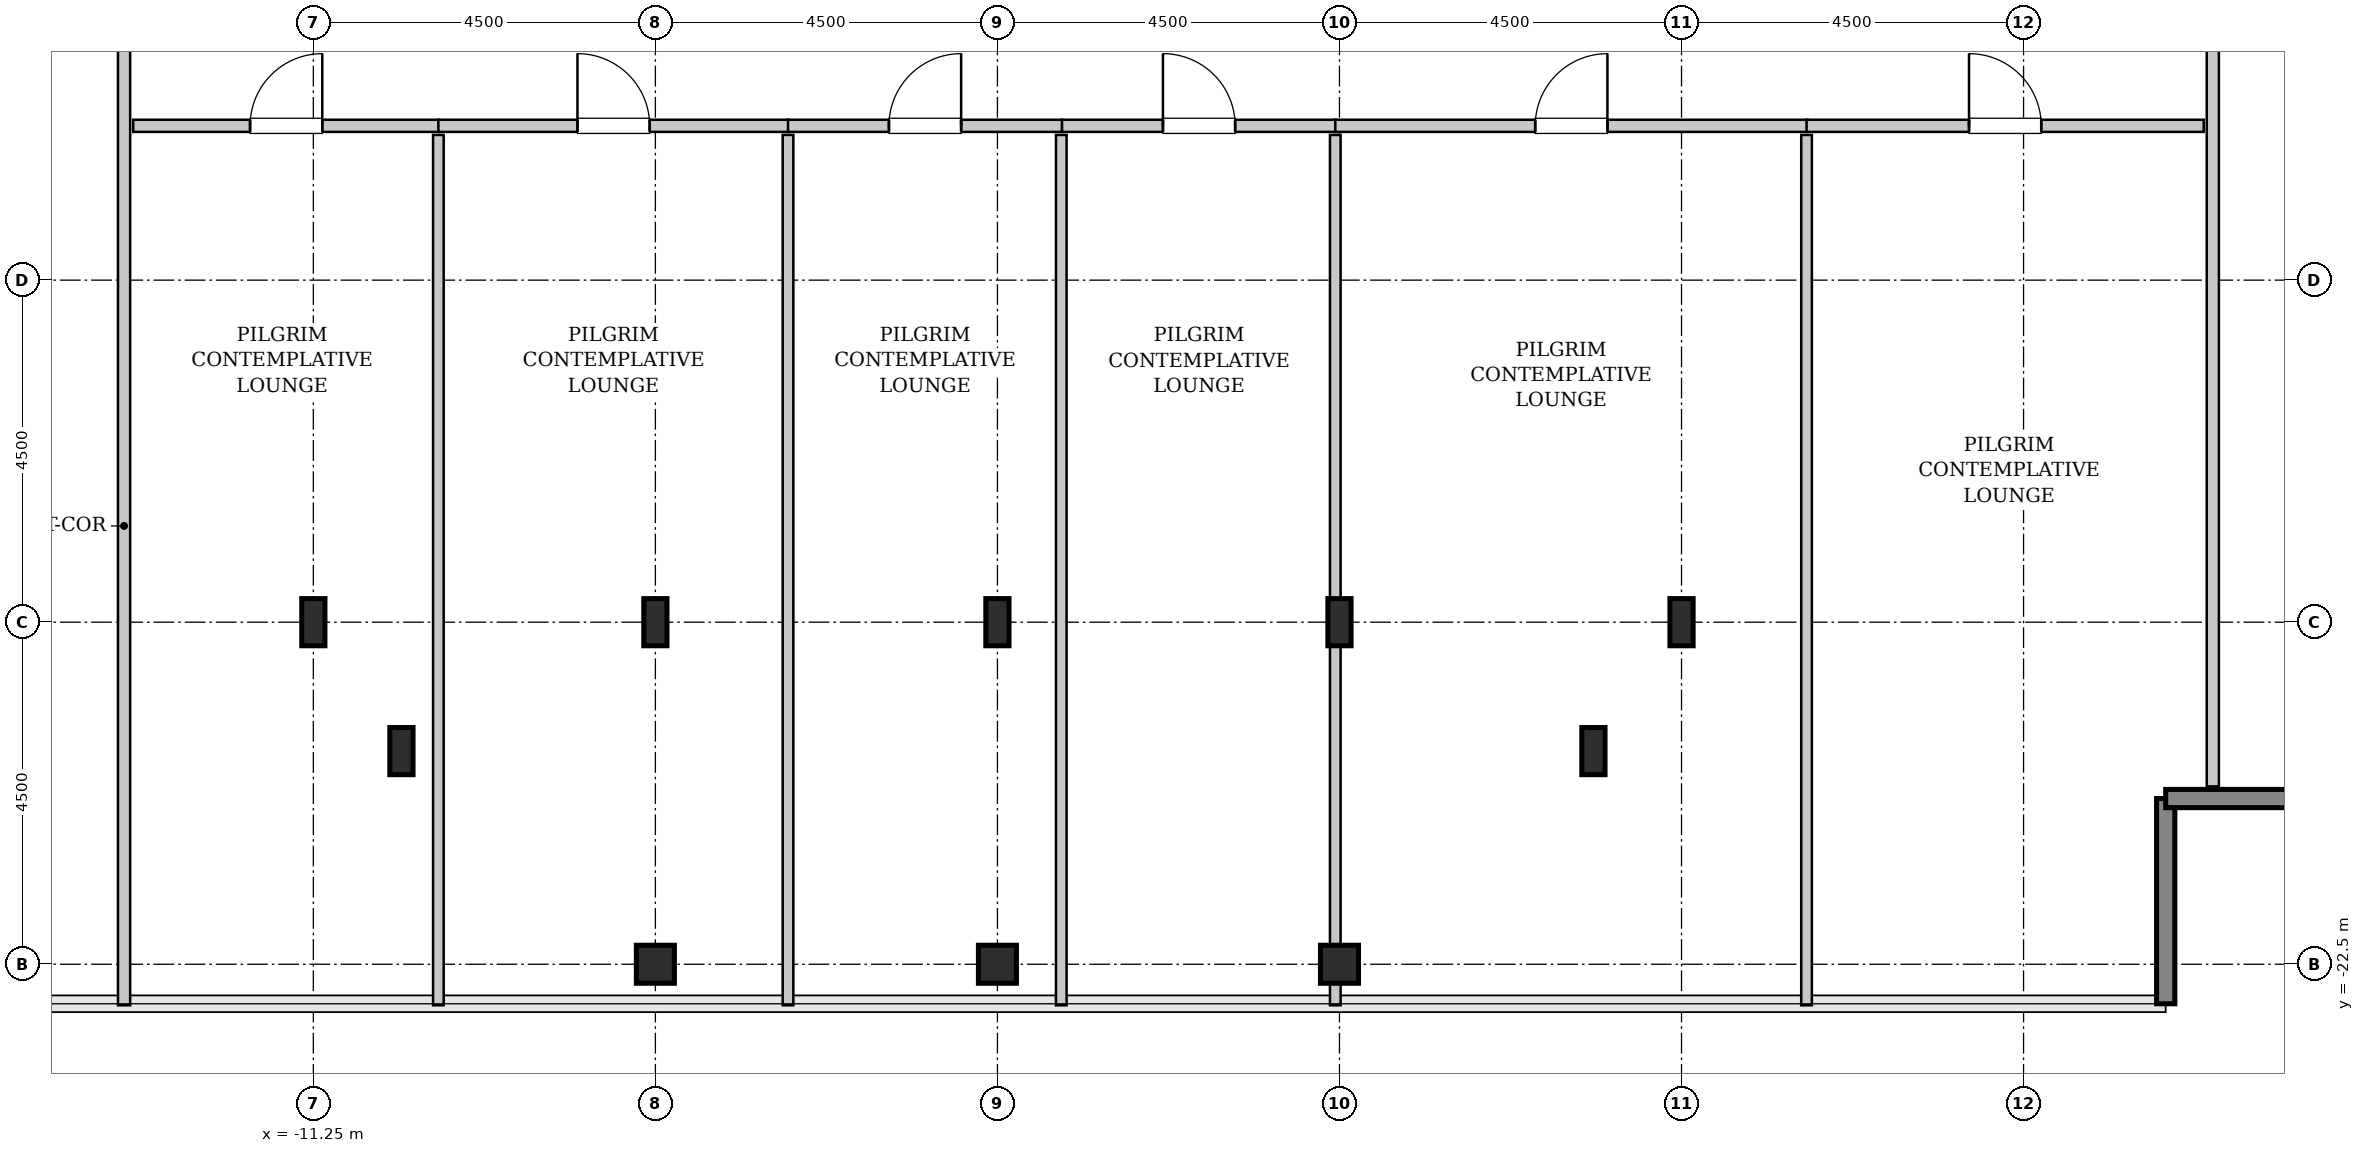
"""IFC4 building model, lengths in metres.
Left out: names, types, materials, properties, quantities, classifications, styles, units other than length and angle.
Written with IfcOpenShell. Run it as: python <this file> out.ifc"""

import sys

from ifc_helpers import new_model, si_unit, direction, frame, frame_2d, origin, origin_2d, place, context, subcontext, project, spatial, rectangle, hollow_rectangle, i_section, extrude, source, transform, mapped, element, fill, save


model = new_model("IFC4")
c1 = context("Model", 3, precision=1e-05, world=origin(), true_north=direction((0.0, 1.0)))
c2 = subcontext(c1, "Body", "Model", "MODEL_VIEW")
j1 = project(units=[si_unit("LENGTHUNIT", "METRE"), si_unit("PLANEANGLEUNIT", "RADIAN")], contexts=[c1])
p1 = place(None, origin())
s1 = spatial("IfcSite", under=j1, at=p1, CompositionType="ELEMENT")
p2 = place(p1, origin())
s2 = spatial("IfcBuilding", under=s1, at=p2, CompositionType="ELEMENT")
p3 = place(p2, frame((0.0, 0.0, 341.4)))
s3 = spatial("IfcBuildingStorey", under=s2, at=p3, CompositionType="ELEMENT", Elevation=341.4)
m1 = source(origin(), c2, "Body", "SweptSolid", [
    extrude(i_section(OverallWidth=0.305, OverallDepth=0.62, WebThickness=0.021, FlangeThickness=0.04, FilletRadius=0.027, at=origin_2d()), origin(), (0.0, 0.0, 1.0), 3.8),
])
for number, where, z_axis, x_axis in (
    (1, (-11.25, -18.0, 0.0), (0.0, 0.0, 1.0), (1.0, 0.0, 0.0)),
    (2, (-10.091, -19.696, 0.0), (0.0, 0.0, 1.0), (1.0, 0.0, 0.0)),
):
    element("IfcColumn", number, at=place(p3, frame(where, z_axis=z_axis, x_axis=x_axis)), inside=s3, PredefinedType="COLUMN", context=c2, shape_type="MappedRepresentation", body=[
        mapped(m1, transform((0.0, 0.0, 0.0), x_axis=(1.0, 0.0, 0.0), y_axis=(0.0, 1.0, 0.0), z_axis=(0.0, 0.0, 1.0), scale=1.0)),
    ])
m2 = source(origin(), c2, "Body", "SweptSolid", [
    extrude(hollow_rectangle(XDim=0.5, YDim=0.5, WallThickness=0.025, InnerFilletRadius=0.025, OuterFilletRadius=0.05, at=origin_2d()), origin(), (0.0, 0.0, 1.0), 3.8),
])
p4 = place(p3, frame((-6.75, -22.5, 0.0), z_axis=(0.0, 0.0, 1.0), x_axis=(1.0, 0.0, 0.0)))
e3 = element("IfcColumn", 3, at=p4, inside=s3, PredefinedType="COLUMN", context=c2, shape_type="MappedRepresentation", body=[
    mapped(m2, transform((0.0, 0.0, 0.0), x_axis=(1.0, 0.0, 0.0), y_axis=(0.0, 1.0, 0.0), z_axis=(0.0, 0.0, 1.0), scale=1.0)),
])
p5 = place(p3, frame((-6.75, -18.0, 0.0), z_axis=(0.0, 0.0, 1.0), x_axis=(1.0, 0.0, 0.0)))
e4 = element("IfcColumn", 4, at=p5, inside=s3, PredefinedType="COLUMN", context=c2, shape_type="MappedRepresentation", body=[
    mapped(m1, transform((0.0, 0.0, 0.0), x_axis=(1.0, 0.0, 0.0), y_axis=(0.0, 1.0, 0.0), z_axis=(0.0, 0.0, 1.0), scale=1.0)),
])
p6 = place(p3, frame((-2.25, -22.5, 0.0), z_axis=(0.0, 0.0, 1.0), x_axis=(1.0, 0.0, 0.0)))
e5 = element("IfcColumn", 5, at=p6, inside=s3, PredefinedType="COLUMN", context=c2, shape_type="MappedRepresentation", body=[
    mapped(m2, transform((0.0, 0.0, 0.0), x_axis=(1.0, 0.0, 0.0), y_axis=(0.0, 1.0, 0.0), z_axis=(0.0, 0.0, 1.0), scale=1.0)),
])
p7 = place(p3, frame((-2.25, -18.0, 0.0), z_axis=(0.0, 0.0, 1.0), x_axis=(1.0, 0.0, 0.0)))
e6 = element("IfcColumn", 6, at=p7, inside=s3, PredefinedType="COLUMN", context=c2, shape_type="MappedRepresentation", body=[
    mapped(m1, transform((0.0, 0.0, 0.0), x_axis=(1.0, 0.0, 0.0), y_axis=(0.0, 1.0, 0.0), z_axis=(0.0, 0.0, 1.0), scale=1.0)),
])
p8 = place(p3, frame((2.25, -22.5, 0.0), z_axis=(0.0, 0.0, 1.0), x_axis=(1.0, 0.0, 0.0)))
e7 = element("IfcColumn", 7, at=p8, inside=s3, PredefinedType="COLUMN", context=c2, shape_type="MappedRepresentation", body=[
    mapped(m2, transform((0.0, 0.0, 0.0), x_axis=(1.0, 0.0, 0.0), y_axis=(0.0, 1.0, 0.0), z_axis=(0.0, 0.0, 1.0), scale=1.0)),
])
for number, where, z_axis, x_axis in (
    (8, (2.25, -18.0, 0.0), (0.0, 0.0, 1.0), (1.0, 0.0, 0.0)),
    (9, (5.591, -19.696, 0.0), (0.0, 0.0, 1.0), (1.0, 0.0, 0.0)),
    (10, (6.75, -18.0, 0.0), (0.0, 0.0, 1.0), (1.0, 0.0, 0.0)),
):
    element("IfcColumn", number, at=place(p3, frame(where, z_axis=z_axis, x_axis=x_axis)), inside=s3, PredefinedType="COLUMN", context=c2, shape_type="MappedRepresentation", body=[
        mapped(m1, transform((0.0, 0.0, 0.0), x_axis=(1.0, 0.0, 0.0), y_axis=(0.0, 1.0, 0.0), z_axis=(0.0, 0.0, 1.0), scale=1.0)),
    ])
m3 = source(origin(), c2, "Body", "SweptSolid", [
    extrude(rectangle(XDim=2.7, YDim=0.24, at=frame_2d((1.35, 0.0))), origin(), (0.0, 0.0, 1.0), 3.55),
])
for number, where, z_axis, x_axis in (
    (11, (13.12, -23.02, 0.0), (0.0, 0.0, 1.0), (0.0, 1.0, 0.0)),
    (12, (13.12, -20.32, 0.0), (0.0, 0.0, 1.0), (1.0, 0.0, 0.0)),
):
    element("IfcWall", number, at=place(p3, frame(where, z_axis=z_axis, x_axis=x_axis)), inside=s3, PredefinedType="SHEAR", context=c2, shape_type="MappedRepresentation", body=[
        mapped(m3, transform((0.0, 0.0, 0.0), x_axis=(1.0, 0.0, 0.0), y_axis=(0.0, 1.0, 0.0), z_axis=(0.0, 0.0, 1.0), scale=1.0)),
    ])
m4 = source(origin(), c2, "Body", "SweptSolid", [
    extrude(rectangle(XDim=14.545, YDim=0.16, at=frame_2d((7.272, 0.0))), origin(), (0.0, 0.0, 1.0), 3.535),
])
p9 = place(p3, frame((-13.74, -23.04, 0.0), z_axis=(0.0, 0.0, 1.0), x_axis=(0.0, 1.0, 0.0)))
e13 = element("IfcWall", 13, at=p9, inside=s3, PredefinedType="PARTITIONING", context=c2, shape_type="MappedRepresentation", body=[
    mapped(m4, transform((0.0, 0.0, 0.0), x_axis=(1.0, 0.0, 0.0), y_axis=(0.0, 1.0, 0.0), z_axis=(0.0, 0.0, 1.0), scale=1.0)),
])
p10 = place(p9, frame((12.562, 0.0, 0.0)))
e14 = element("IfcOpeningElement", 14, at=p10, cuts=e13, PredefinedType="OPENING", context=c2, shape_type="SweptSolid", body=[
    extrude(rectangle(XDim=0.95, YDim=2.1, at=frame_2d((0.475, 1.05))), frame((0.0, 0.09, 0.0), z_axis=(0.0, -1.0, 0.0), x_axis=(1.0, 0.0, 0.0)), (0.0, 0.0, 1.0), 0.18),
])
m5 = source(origin(), c2, "Body", "SweptSolid", [
    extrude(rectangle(XDim=12.365, YDim=0.16, at=frame_2d((6.183, 0.0))), origin(), (0.0, 0.0, 1.0), 3.535),
])
p11 = place(p3, frame((13.74, -20.16, 0.0), z_axis=(0.0, 0.0, 1.0), x_axis=(0.0, 1.0, 0.0)))
e15 = element("IfcWall", 15, at=p11, inside=s3, PredefinedType="PARTITIONING", context=c2, shape_type="MappedRepresentation", body=[
    mapped(m5, transform((0.0, 0.0, 0.0), x_axis=(1.0, 0.0, 0.0), y_axis=(0.0, 1.0, 0.0), z_axis=(0.0, 0.0, 1.0), scale=1.0)),
])
p12 = place(p11, frame((10.032, 0.0, 0.0)))
e16 = element("IfcOpeningElement", 16, at=p12, cuts=e15, PredefinedType="OPENING", context=c2, shape_type="SweptSolid", body=[
    extrude(rectangle(XDim=0.95, YDim=2.1, at=frame_2d((0.475, 1.05))), frame((0.0, 0.09, 0.0), z_axis=(0.0, -1.0, 0.0), x_axis=(1.0, 0.0, 0.0)), (0.0, 0.0, 1.0), 0.18),
])
m6 = source(origin(), c2, "Body", "SweptSolid", [
    extrude(rectangle(XDim=4.025, YDim=0.16, at=frame_2d((2.013, 0.0))), origin(), (0.0, 0.0, 1.0), 3.535),
])
p13 = place(p3, frame((-13.62, -11.47, 0.0), z_axis=(0.0, 0.0, 1.0), x_axis=(1.0, 0.0, 0.0)))
e17 = element("IfcWall", 17, at=p13, inside=s3, PredefinedType="PARTITIONING", context=c2, shape_type="MappedRepresentation", body=[
    mapped(m6, transform((0.0, 0.0, 0.0), x_axis=(1.0, 0.0, 0.0), y_axis=(0.0, 1.0, 0.0), z_axis=(0.0, 0.0, 1.0), scale=1.0)),
])
p14 = place(p13, frame((1.538, 0.0, 0.0)))
e18 = element("IfcOpeningElement", 18, at=p14, cuts=e17, PredefinedType="OPENING", context=c2, shape_type="SweptSolid", body=[
    extrude(rectangle(XDim=0.95, YDim=2.1, at=frame_2d((0.475, 1.05))), frame((0.0, 0.09, 0.0), z_axis=(0.0, -1.0, 0.0), x_axis=(1.0, 0.0, 0.0)), (0.0, 0.0, 1.0), 0.18),
])
m7 = source(origin(), c2, "Body", "SweptSolid", [
    extrude(rectangle(XDim=11.45, YDim=0.14, at=frame_2d((5.725, 0.0))), origin(), (0.0, 0.0, 1.0), 3.535),
])
p15 = place(p3, frame((-9.605, -23.04, 0.0), z_axis=(0.0, 0.0, 1.0), x_axis=(0.0, 1.0, 0.0)))
e19 = element("IfcWall", 19, at=p15, inside=s3, PredefinedType="PARTITIONING", context=c2, shape_type="MappedRepresentation", body=[
    mapped(m7, transform((0.0, 0.0, 0.0), x_axis=(1.0, 0.0, 0.0), y_axis=(0.0, 1.0, 0.0), z_axis=(0.0, 0.0, 1.0), scale=1.0)),
])
m8 = source(origin(), c2, "Body", "SweptSolid", [
    extrude(rectangle(XDim=4.61, YDim=0.16, at=frame_2d((2.305, 0.0))), origin(), (0.0, 0.0, 1.0), 3.535),
])
p16 = place(p3, frame((-9.605, -11.47, 0.0), z_axis=(0.0, 0.0, 1.0), x_axis=(1.0, 0.0, 0.0)))
e20 = element("IfcWall", 20, at=p16, inside=s3, PredefinedType="PARTITIONING", context=c2, shape_type="MappedRepresentation", body=[
    mapped(m8, transform((0.0, 0.0, 0.0), x_axis=(1.0, 0.0, 0.0), y_axis=(0.0, 1.0, 0.0), z_axis=(0.0, 0.0, 1.0), scale=1.0)),
])
p17 = place(p16, frame((1.83, 0.0, 0.0)))
e21 = element("IfcOpeningElement", 21, at=p17, cuts=e20, PredefinedType="OPENING", context=c2, shape_type="SweptSolid", body=[
    extrude(rectangle(XDim=0.95, YDim=2.1, at=frame_2d((0.475, 1.05))), frame((0.0, 0.09, 0.0), z_axis=(0.0, -1.0, 0.0), x_axis=(1.0, 0.0, 0.0)), (0.0, 0.0, 1.0), 0.18),
])
p18 = place(p3, frame((-5.005, -23.04, 0.0), z_axis=(0.0, 0.0, 1.0), x_axis=(0.0, 1.0, 0.0)))
e22 = element("IfcWall", 22, at=p18, inside=s3, PredefinedType="PARTITIONING", context=c2, shape_type="MappedRepresentation", body=[
    mapped(m7, transform((0.0, 0.0, 0.0), x_axis=(1.0, 0.0, 0.0), y_axis=(0.0, 1.0, 0.0), z_axis=(0.0, 0.0, 1.0), scale=1.0)),
])
m9 = source(origin(), c2, "Body", "SweptSolid", [
    extrude(rectangle(XDim=3.605, YDim=0.16, at=frame_2d((1.802, 0.0))), origin(), (0.0, 0.0, 1.0), 3.535),
])
p19 = place(p3, frame((-5.005, -11.47, 0.0), z_axis=(0.0, 0.0, 1.0), x_axis=(1.0, 0.0, 0.0)))
e23 = element("IfcWall", 23, at=p19, inside=s3, PredefinedType="PARTITIONING", context=c2, shape_type="MappedRepresentation", body=[
    mapped(m9, transform((0.0, 0.0, 0.0), x_axis=(1.0, 0.0, 0.0), y_axis=(0.0, 1.0, 0.0), z_axis=(0.0, 0.0, 1.0), scale=1.0)),
])
p20 = place(p19, frame((1.327, 0.0, 0.0)))
e24 = element("IfcOpeningElement", 24, at=p20, cuts=e23, PredefinedType="OPENING", context=c2, shape_type="SweptSolid", body=[
    extrude(rectangle(XDim=0.95, YDim=2.1, at=frame_2d((0.475, 1.05))), frame((0.0, 0.09, 0.0), z_axis=(0.0, -1.0, 0.0), x_axis=(1.0, 0.0, 0.0)), (0.0, 0.0, 1.0), 0.18),
])
p21 = place(p3, frame((-1.41, -23.04, 0.0), z_axis=(0.0, 0.0, 1.0), x_axis=(0.0, 1.0, 0.0)))
e25 = element("IfcWall", 25, at=p21, inside=s3, PredefinedType="PARTITIONING", context=c2, shape_type="MappedRepresentation", body=[
    mapped(m7, transform((0.0, 0.0, 0.0), x_axis=(1.0, 0.0, 0.0), y_axis=(0.0, 1.0, 0.0), z_axis=(0.0, 0.0, 1.0), scale=1.0)),
])
p22 = place(p3, frame((-1.4, -11.47, 0.0), z_axis=(0.0, 0.0, 1.0), x_axis=(1.0, 0.0, 0.0)))
e26 = element("IfcWall", 26, at=p22, inside=s3, PredefinedType="PARTITIONING", context=c2, shape_type="MappedRepresentation", body=[
    mapped(m9, transform((0.0, 0.0, 0.0), x_axis=(1.0, 0.0, 0.0), y_axis=(0.0, 1.0, 0.0), z_axis=(0.0, 0.0, 1.0), scale=1.0)),
])
p23 = place(p22, frame((1.327, 0.0, 0.0)))
e27 = element("IfcOpeningElement", 27, at=p23, cuts=e26, PredefinedType="OPENING", context=c2, shape_type="SweptSolid", body=[
    extrude(rectangle(XDim=0.95, YDim=2.1, at=frame_2d((0.475, 1.05))), frame((0.0, 0.09, 0.0), z_axis=(0.0, -1.0, 0.0), x_axis=(1.0, 0.0, 0.0)), (0.0, 0.0, 1.0), 0.18),
])
m10 = source(origin(), c2, "Body", "SweptSolid", [
    extrude(rectangle(XDim=11.45, YDim=0.14, at=frame_2d((5.725, 0.0))), origin(), (0.0, 0.0, 1.0), 2.975),
])
p24 = place(p3, frame((2.195, -23.04, 0.0), z_axis=(0.0, 0.0, 1.0), x_axis=(0.0, 1.0, 0.0)))
e28 = element("IfcWall", 28, at=p24, inside=s3, PredefinedType="PARTITIONING", context=c2, shape_type="MappedRepresentation", body=[
    mapped(m10, transform((0.0, 0.0, 0.0), x_axis=(1.0, 0.0, 0.0), y_axis=(0.0, 1.0, 0.0), z_axis=(0.0, 0.0, 1.0), scale=1.0)),
])
m11 = source(origin(), c2, "Body", "SweptSolid", [
    extrude(rectangle(XDim=6.21, YDim=0.16, at=frame_2d((3.105, 0.0))), origin(), (0.0, 0.0, 1.0), 3.535),
])
p25 = place(p3, frame((2.195, -11.47, 0.0), z_axis=(0.0, 0.0, 1.0), x_axis=(1.0, 0.0, 0.0)))
e29 = element("IfcWall", 29, at=p25, inside=s3, PredefinedType="PARTITIONING", context=c2, shape_type="MappedRepresentation", body=[
    mapped(m11, transform((0.0, 0.0, 0.0), x_axis=(1.0, 0.0, 0.0), y_axis=(0.0, 1.0, 0.0), z_axis=(0.0, 0.0, 1.0), scale=1.0)),
])
p26 = place(p25, frame((2.63, 0.0, 0.0)))
e30 = element("IfcOpeningElement", 30, at=p26, cuts=e29, PredefinedType="OPENING", context=c2, shape_type="SweptSolid", body=[
    extrude(rectangle(XDim=0.95, YDim=2.1, at=frame_2d((0.475, 1.05))), frame((0.0, 0.09, 0.0), z_axis=(0.0, -1.0, 0.0), x_axis=(1.0, 0.0, 0.0)), (0.0, 0.0, 1.0), 0.18),
])
p27 = place(p3, frame((8.395, -23.04, 0.0), z_axis=(0.0, 0.0, 1.0), x_axis=(0.0, 1.0, 0.0)))
e31 = element("IfcWall", 31, at=p27, inside=s3, PredefinedType="PARTITIONING", context=c2, shape_type="MappedRepresentation", body=[
    mapped(m7, transform((0.0, 0.0, 0.0), x_axis=(1.0, 0.0, 0.0), y_axis=(0.0, 1.0, 0.0), z_axis=(0.0, 0.0, 1.0), scale=1.0)),
])
m12 = source(origin(), c2, "Body", "SweptSolid", [
    extrude(rectangle(XDim=5.225, YDim=0.16, at=frame_2d((2.613, 0.0))), origin(), (0.0, 0.0, 1.0), 3.535),
])
p28 = place(p3, frame((8.395, -11.47, 0.0), z_axis=(0.0, 0.0, 1.0), x_axis=(1.0, 0.0, 0.0)))
e32 = element("IfcWall", 32, at=p28, inside=s3, PredefinedType="PARTITIONING", context=c2, shape_type="MappedRepresentation", body=[
    mapped(m12, transform((0.0, 0.0, 0.0), x_axis=(1.0, 0.0, 0.0), y_axis=(0.0, 1.0, 0.0), z_axis=(0.0, 0.0, 1.0), scale=1.0)),
])
p29 = place(p28, frame((2.137, 0.0, 0.0)))
e33 = element("IfcOpeningElement", 33, at=p29, cuts=e32, PredefinedType="OPENING", context=c2, shape_type="SweptSolid", body=[
    extrude(rectangle(XDim=0.95, YDim=2.1, at=frame_2d((0.475, 1.05))), frame((0.0, 0.09, 0.0), z_axis=(0.0, -1.0, 0.0), x_axis=(1.0, 0.0, 0.0)), (0.0, 0.0, 1.0), 0.18),
])
m13 = source(origin(), c2, "Body", "SweptSolid", [
    extrude(rectangle(XDim=0.95, YDim=2.1, at=frame_2d((0.475, 1.05))), frame((0.0, 0.025, 0.0), z_axis=(0.0, -1.0, 0.0), x_axis=(1.0, 0.0, 0.0)), (0.0, 0.0, 1.0), 0.05),
])
p30 = place(p14, origin())
e34 = element("IfcDoor", 34, at=p30, inside=s3, OperationType="SINGLE_SWING_RIGHT", PredefinedType="DOOR", context=c2, shape_type="MappedRepresentation", body=[
    mapped(m13, transform((0.0, 0.0, 0.0), x_axis=(1.0, 0.0, 0.0), y_axis=(0.0, 1.0, 0.0), z_axis=(0.0, 0.0, 1.0), scale=1.0)),
])
fill(e18, e34)
p31 = place(p17, origin())
e35 = element("IfcDoor", 35, at=p31, inside=s3, OperationType="SINGLE_SWING_LEFT", PredefinedType="DOOR", context=c2, shape_type="MappedRepresentation", body=[
    mapped(m13, transform((0.0, 0.0, 0.0), x_axis=(1.0, 0.0, 0.0), y_axis=(0.0, 1.0, 0.0), z_axis=(0.0, 0.0, 1.0), scale=1.0)),
])
fill(e21, e35)
p32 = place(p20, origin())
e36 = element("IfcDoor", 36, at=p32, inside=s3, OperationType="SINGLE_SWING_RIGHT", PredefinedType="DOOR", context=c2, shape_type="MappedRepresentation", body=[
    mapped(m13, transform((0.0, 0.0, 0.0), x_axis=(1.0, 0.0, 0.0), y_axis=(0.0, 1.0, 0.0), z_axis=(0.0, 0.0, 1.0), scale=1.0)),
])
fill(e24, e36)
p33 = place(p23, origin())
e37 = element("IfcDoor", 37, at=p33, inside=s3, OperationType="SINGLE_SWING_LEFT", PredefinedType="DOOR", context=c2, shape_type="MappedRepresentation", body=[
    mapped(m13, transform((0.0, 0.0, 0.0), x_axis=(1.0, 0.0, 0.0), y_axis=(0.0, 1.0, 0.0), z_axis=(0.0, 0.0, 1.0), scale=1.0)),
])
fill(e27, e37)
p34 = place(p26, origin())
e38 = element("IfcDoor", 38, at=p34, inside=s3, OperationType="SINGLE_SWING_RIGHT", PredefinedType="DOOR", context=c2, shape_type="MappedRepresentation", body=[
    mapped(m13, transform((0.0, 0.0, 0.0), x_axis=(1.0, 0.0, 0.0), y_axis=(0.0, 1.0, 0.0), z_axis=(0.0, 0.0, 1.0), scale=1.0)),
])
fill(e30, e38)
p35 = place(p29, origin())
e39 = element("IfcDoor", 39, at=p35, inside=s3, OperationType="SINGLE_SWING_LEFT", PredefinedType="DOOR", context=c2, shape_type="MappedRepresentation", body=[
    mapped(m13, transform((0.0, 0.0, 0.0), x_axis=(1.0, 0.0, 0.0), y_axis=(0.0, 1.0, 0.0), z_axis=(0.0, 0.0, 1.0), scale=1.0)),
])
fill(e33, e39)
save(model, sys.argv[1])
